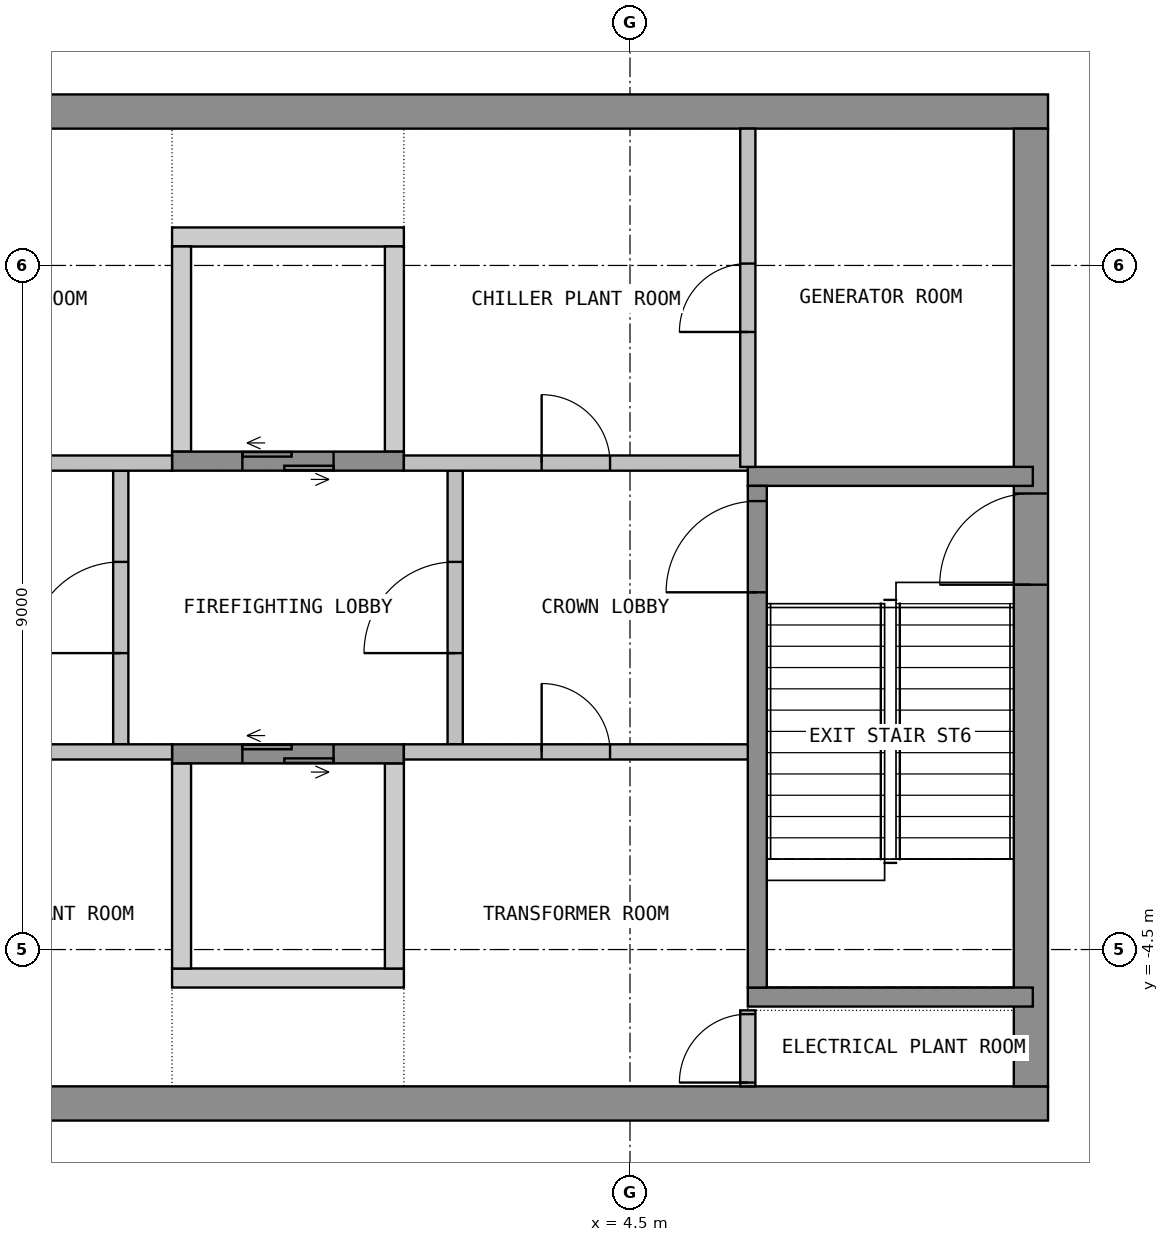
"""IFC4 building model, lengths in metres.
Left out: names, types, materials, properties, quantities, classifications, styles, units other than length and angle.
Written with IfcOpenShell. Run it as: python <this file> out.ifc"""

import sys

from ifc_helpers import new_model, si_unit, direction, frame, frame_2d, origin, place, context, subcontext, project, spatial, polyline, rectangle, outline, extrude, element, fill, save


model = new_model("IFC4")
c1 = context("Model", 3, precision=1e-05, world=origin(), true_north=direction((0.0, 1.0)))
c2 = subcontext(c1, "Body", "Model", "MODEL_VIEW")
j1 = project(units=[si_unit("LENGTHUNIT", "METRE"), si_unit("PLANEANGLEUNIT", "RADIAN")], contexts=[c1])
p1 = place(None, origin())
s1 = spatial("IfcSite", under=j1, at=p1, CompositionType="ELEMENT")
p2 = place(p1, origin())
s2 = spatial("IfcBuilding", under=s1, at=p2, CompositionType="ELEMENT")
p3 = place(p2, frame((0.0, 0.0, 323.4)))
s3 = spatial("IfcBuildingStorey", under=s2, at=p3, CompositionType="ELEMENT", Elevation=323.4)
for number, where, z_axis, x_axis in (
    (1, (-10.0, 6.525, 0.0), (0.0, 0.0, 1.0), (1.0, 0.0, 0.0)),
    (2, (-10.0, -6.525, 0.0), (0.0, 0.0, 1.0), (1.0, 0.0, 0.0)),
):
    element("IfcWall", number, at=place(p3, frame(where, z_axis=z_axis, x_axis=x_axis)), inside=s3, PredefinedType="SHEAR", context=c2, shape_type="SweptSolid", body=[
        extrude(rectangle(XDim=20.0, YDim=0.45, at=frame_2d((10.0, 0.0))), origin(), (0.0, 0.0, 1.0), 4.05),
    ])
p4 = place(p3, frame((9.775, -6.3, 0.0), z_axis=(0.0, 0.0, 1.0), x_axis=(0.0, 1.0, 0.0)))
e3 = element("IfcWall", 3, at=p4, inside=s3, PredefinedType="SHEAR", context=c2, shape_type="SweptSolid", body=[
    extrude(rectangle(XDim=12.6, YDim=0.45, at=frame_2d((6.3, 0.0))), origin(), (0.0, 0.0, 1.0), 4.05),
])
p5 = place(p4, frame((6.6, 0.0, 0.0)))
e4 = element("IfcOpeningElement", 4, at=p5, cuts=e3, PredefinedType="OPENING", context=c2, shape_type="SweptSolid", body=[
    extrude(rectangle(XDim=1.2, YDim=2.1, at=frame_2d((0.6, 1.05))), frame((0.0, 0.235, 0.0), z_axis=(0.0, -1.0, 0.0), x_axis=(1.0, 0.0, 0.0)), (0.0, 0.0, 1.0), 0.47),
])
p6 = place(p3, origin())
e5 = element("IfcWall", 5, at=p6, inside=s3, PredefinedType="SHEAR", context=c2, shape_type="SweptSolid", body=[
    extrude(outline(polyline([(-1.525, 4.75), (1.525, 4.75), (1.525, 5.0), (-1.525, 5.0), (-1.525, 4.75)])), origin(), (0.0, 0.0, 1.0), 4.05),
])
p7 = place(p3, origin())
e6 = element("IfcWall", 6, at=p7, inside=s3, PredefinedType="SHEAR", context=c2, shape_type="SweptSolid", body=[
    extrude(outline(polyline([(-1.525, 2.05), (-1.275, 2.05), (-1.275, 4.75), (-1.525, 4.75), (-1.525, 2.05)])), origin(), (0.0, 0.0, 1.0), 4.05),
])
p8 = place(p3, origin())
e7 = element("IfcWall", 7, at=p8, inside=s3, PredefinedType="SHEAR", context=c2, shape_type="SweptSolid", body=[
    extrude(outline(polyline([(1.275, 2.05), (1.525, 2.05), (1.525, 4.75), (1.275, 4.75), (1.275, 2.05)])), origin(), (0.0, 0.0, 1.0), 4.05),
])
p9 = place(p3, frame((-1.525, 1.925, 0.0), z_axis=(0.0, 0.0, 1.0), x_axis=(1.0, 0.0, 0.0)))
e8 = element("IfcWall", 8, at=p9, inside=s3, PredefinedType="SHEAR", context=c2, shape_type="SweptSolid", body=[
    extrude(rectangle(XDim=3.05, YDim=0.25, at=frame_2d((1.525, 0.0))), origin(), (0.0, 0.0, 1.0), 4.05),
])
p10 = place(p9, frame((0.925, 0.0, 0.0)))
e9 = element("IfcOpeningElement", 9, at=p10, cuts=e8, PredefinedType="OPENING", context=c2, shape_type="SweptSolid", body=[
    extrude(rectangle(XDim=1.2, YDim=2.1, at=frame_2d((0.6, 1.05))), frame((0.0, 0.135, 0.0), z_axis=(0.0, -1.0, 0.0), x_axis=(1.0, 0.0, 0.0)), (0.0, 0.0, 1.0), 0.27),
])
p11 = place(p3, origin())
e10 = element("IfcWall", 10, at=p11, inside=s3, PredefinedType="SHEAR", context=c2, shape_type="SweptSolid", body=[
    extrude(outline(polyline([(-1.525, -5.0), (1.525, -5.0), (1.525, -4.75), (-1.525, -4.75), (-1.525, -5.0)])), origin(), (0.0, 0.0, 1.0), 4.05),
])
p12 = place(p3, origin())
e11 = element("IfcWall", 11, at=p12, inside=s3, PredefinedType="SHEAR", context=c2, shape_type="SweptSolid", body=[
    extrude(outline(polyline([(-1.525, -4.75), (-1.275, -4.75), (-1.275, -2.05), (-1.525, -2.05), (-1.525, -4.75)])), origin(), (0.0, 0.0, 1.0), 4.05),
])
p13 = place(p3, origin())
e12 = element("IfcWall", 12, at=p13, inside=s3, PredefinedType="SHEAR", context=c2, shape_type="SweptSolid", body=[
    extrude(outline(polyline([(1.275, -4.75), (1.525, -4.75), (1.525, -2.05), (1.275, -2.05), (1.275, -4.75)])), origin(), (0.0, 0.0, 1.0), 4.05),
])
p14 = place(p3, frame((-1.525, -1.925, 0.0), z_axis=(0.0, 0.0, 1.0), x_axis=(1.0, 0.0, 0.0)))
e13 = element("IfcWall", 13, at=p14, inside=s3, PredefinedType="SHEAR", context=c2, shape_type="SweptSolid", body=[
    extrude(rectangle(XDim=3.05, YDim=0.25, at=frame_2d((1.525, 0.0))), origin(), (0.0, 0.0, 1.0), 4.05),
])
p15 = place(p14, frame((0.925, 0.0, 0.0)))
e14 = element("IfcOpeningElement", 14, at=p15, cuts=e13, PredefinedType="OPENING", context=c2, shape_type="SweptSolid", body=[
    extrude(rectangle(XDim=1.2, YDim=2.1, at=frame_2d((0.6, 1.05))), frame((0.0, 0.135, 0.0), z_axis=(0.0, -1.0, 0.0), x_axis=(1.0, 0.0, 0.0)), (0.0, 0.0, 1.0), 0.27),
])
p16 = place(p3, frame((-2.2, -1.8, 0.0), z_axis=(0.0, 0.0, 1.0), x_axis=(0.0, 1.0, 0.0)))
e15 = element("IfcWall", 15, at=p16, inside=s3, PredefinedType="PARTITIONING", context=c2, shape_type="SweptSolid", body=[
    extrude(rectangle(XDim=3.6, YDim=0.2, at=frame_2d((1.8, 0.0))), origin(), (0.0, 0.0, 1.0), 4.05),
])
p17 = place(p16, frame((1.2, 0.0, 0.0)))
e16 = element("IfcOpeningElement", 16, at=p17, cuts=e15, PredefinedType="OPENING", context=c2, shape_type="SweptSolid", body=[
    extrude(rectangle(XDim=1.2, YDim=2.1, at=frame_2d((0.6, 1.05))), frame((0.0, 0.11, 0.0), z_axis=(0.0, -1.0, 0.0), x_axis=(1.0, 0.0, 0.0)), (0.0, 0.0, 1.0), 0.22),
])
p18 = place(p3, frame((2.2, -1.8, 0.0), z_axis=(0.0, 0.0, 1.0), x_axis=(0.0, 1.0, 0.0)))
e17 = element("IfcWall", 17, at=p18, inside=s3, PredefinedType="PARTITIONING", context=c2, shape_type="SweptSolid", body=[
    extrude(rectangle(XDim=3.6, YDim=0.2, at=frame_2d((1.8, 0.0))), origin(), (0.0, 0.0, 1.0), 4.05),
])
p19 = place(p18, frame((1.2, 0.0, 0.0)))
e18 = element("IfcOpeningElement", 18, at=p19, cuts=e17, PredefinedType="OPENING", context=c2, shape_type="SweptSolid", body=[
    extrude(rectangle(XDim=1.2, YDim=2.1, at=frame_2d((0.6, 1.05))), frame((0.0, 0.11, 0.0), z_axis=(0.0, -1.0, 0.0), x_axis=(1.0, 0.0, 0.0)), (0.0, 0.0, 1.0), 0.22),
])
for number, where, z_axis, x_axis in (
    (19, (6.05, -5.125, 0.0), (0.0, 0.0, 1.0), (1.0, 0.0, 0.0)),
    (20, (6.05, 1.725, 0.0), (0.0, 0.0, 1.0), (1.0, 0.0, 0.0)),
):
    element("IfcWall", number, at=place(p3, frame(where, z_axis=z_axis, x_axis=x_axis)), inside=s3, PredefinedType="SHEAR", context=c2, shape_type="SweptSolid", body=[
        extrude(rectangle(XDim=3.75, YDim=0.25, at=frame_2d((1.875, 0.0))), origin(), (0.0, 0.0, 1.0), 4.05),
    ])
p20 = place(p3, frame((6.175, -5.0, 0.0), z_axis=(0.0, 0.0, 1.0), x_axis=(0.0, 1.0, 0.0)))
e21 = element("IfcWall", 21, at=p20, inside=s3, PredefinedType="SHEAR", context=c2, shape_type="SweptSolid", body=[
    extrude(rectangle(XDim=6.6, YDim=0.25, at=frame_2d((3.3, 0.0))), origin(), (0.0, 0.0, 1.0), 4.05),
])
p21 = place(p20, frame((5.2, 0.0, 0.0)))
e22 = element("IfcOpeningElement", 22, at=p21, cuts=e21, PredefinedType="OPENING", context=c2, shape_type="SweptSolid", body=[
    extrude(rectangle(XDim=1.2, YDim=2.1, at=frame_2d((0.6, 1.05))), frame((0.0, 0.135, 0.0), z_axis=(0.0, -1.0, 0.0), x_axis=(1.0, 0.0, 0.0)), (0.0, 0.0, 1.0), 0.27),
])
p22 = place(p3, frame((-6.05, 1.9, 0.0), z_axis=(0.0, 0.0, 1.0), x_axis=(1.0, 0.0, 0.0)))
e23 = element("IfcWall", 23, at=p22, inside=s3, PredefinedType="PARTITIONING", context=c2, shape_type="SweptSolid", body=[
    extrude(rectangle(XDim=4.525, YDim=0.2, at=frame_2d((2.263, 0.0))), origin(), (0.0, 0.0, 1.0), 4.05),
])
p23 = place(p22, frame((1.812, 0.0, 0.0)))
e24 = element("IfcOpeningElement", 24, at=p23, cuts=e23, PredefinedType="OPENING", context=c2, shape_type="SweptSolid", body=[
    extrude(rectangle(XDim=0.9, YDim=2.1, at=frame_2d((0.45, 1.05))), frame((0.0, 0.11, 0.0), z_axis=(0.0, -1.0, 0.0), x_axis=(1.0, 0.0, 0.0)), (0.0, 0.0, 1.0), 0.22),
])
p24 = place(p3, frame((-6.05, -1.9, 0.0), z_axis=(0.0, 0.0, 1.0), x_axis=(1.0, 0.0, 0.0)))
e25 = element("IfcWall", 25, at=p24, inside=s3, PredefinedType="PARTITIONING", context=c2, shape_type="SweptSolid", body=[
    extrude(rectangle(XDim=4.525, YDim=0.2, at=frame_2d((2.263, 0.0))), origin(), (0.0, 0.0, 1.0), 4.05),
])
p25 = place(p24, frame((1.812, 0.0, 0.0)))
e26 = element("IfcOpeningElement", 26, at=p25, cuts=e25, PredefinedType="OPENING", context=c2, shape_type="SweptSolid", body=[
    extrude(rectangle(XDim=0.9, YDim=2.1, at=frame_2d((0.45, 1.05))), frame((0.0, 0.11, 0.0), z_axis=(0.0, -1.0, 0.0), x_axis=(1.0, 0.0, 0.0)), (0.0, 0.0, 1.0), 0.22),
])
p26 = place(p3, frame((1.525, 1.9, 0.0), z_axis=(0.0, 0.0, 1.0), x_axis=(1.0, 0.0, 0.0)))
e27 = element("IfcWall", 27, at=p26, inside=s3, PredefinedType="PARTITIONING", context=c2, shape_type="SweptSolid", body=[
    extrude(rectangle(XDim=4.525, YDim=0.2, at=frame_2d((2.263, 0.0))), origin(), (0.0, 0.0, 1.0), 4.05),
])
p27 = place(p26, frame((1.812, 0.0, 0.0)))
e28 = element("IfcOpeningElement", 28, at=p27, cuts=e27, PredefinedType="OPENING", context=c2, shape_type="SweptSolid", body=[
    extrude(rectangle(XDim=0.9, YDim=2.1, at=frame_2d((0.45, 1.05))), frame((0.0, 0.11, 0.0), z_axis=(0.0, -1.0, 0.0), x_axis=(1.0, 0.0, 0.0)), (0.0, 0.0, 1.0), 0.22),
])
p28 = place(p3, frame((1.525, -1.9, 0.0), z_axis=(0.0, 0.0, 1.0), x_axis=(1.0, 0.0, 0.0)))
e29 = element("IfcWall", 29, at=p28, inside=s3, PredefinedType="PARTITIONING", context=c2, shape_type="SweptSolid", body=[
    extrude(rectangle(XDim=4.525, YDim=0.2, at=frame_2d((2.263, 0.0))), origin(), (0.0, 0.0, 1.0), 4.05),
])
p29 = place(p28, frame((1.812, 0.0, 0.0)))
e30 = element("IfcOpeningElement", 30, at=p29, cuts=e29, PredefinedType="OPENING", context=c2, shape_type="SweptSolid", body=[
    extrude(rectangle(XDim=0.9, YDim=2.1, at=frame_2d((0.45, 1.05))), frame((0.0, 0.11, 0.0), z_axis=(0.0, -1.0, 0.0), x_axis=(1.0, 0.0, 0.0)), (0.0, 0.0, 1.0), 0.22),
])
p30 = place(p3, frame((6.05, 1.85, 0.0), z_axis=(0.0, 0.0, 1.0), x_axis=(0.0, 1.0, 0.0)))
e31 = element("IfcWall", 31, at=p30, inside=s3, PredefinedType="PARTITIONING", context=c2, shape_type="SweptSolid", body=[
    extrude(rectangle(XDim=4.45, YDim=0.2, at=frame_2d((2.225, 0.0))), origin(), (0.0, 0.0, 1.0), 4.05),
])
p31 = place(p30, frame((1.775, 0.0, 0.0)))
e32 = element("IfcOpeningElement", 32, at=p31, cuts=e31, PredefinedType="OPENING", context=c2, shape_type="SweptSolid", body=[
    extrude(rectangle(XDim=0.9, YDim=2.1, at=frame_2d((0.45, 1.05))), frame((0.0, 0.11, 0.0), z_axis=(0.0, -1.0, 0.0), x_axis=(1.0, 0.0, 0.0)), (0.0, 0.0, 1.0), 0.22),
])
p32 = place(p3, frame((6.05, -6.3, 0.0), z_axis=(0.0, 0.0, 1.0), x_axis=(0.0, 1.0, 0.0)))
e33 = element("IfcWall", 33, at=p32, inside=s3, PredefinedType="PARTITIONING", context=c2, shape_type="SweptSolid", body=[
    extrude(rectangle(XDim=1.0, YDim=0.2, at=frame_2d((0.5, 0.0))), origin(), (0.0, 0.0, 1.0), 4.05),
])
p33 = place(p32, frame((0.05, 0.0, 0.0)))
e34 = element("IfcOpeningElement", 34, at=p33, cuts=e33, PredefinedType="OPENING", context=c2, shape_type="SweptSolid", body=[
    extrude(rectangle(XDim=0.9, YDim=2.1, at=frame_2d((0.45, 1.05))), frame((0.0, 0.11, 0.0), z_axis=(0.0, -1.0, 0.0), x_axis=(1.0, 0.0, 0.0)), (0.0, 0.0, 1.0), 0.22),
])
p34 = place(p5, origin())
e35 = element("IfcDoor", 35, at=p34, inside=s3, OperationType="SINGLE_SWING_RIGHT", PredefinedType="DOOR", context=c2, shape_type="SweptSolid", body=[
    extrude(rectangle(XDim=1.2, YDim=2.1, at=frame_2d((0.6, 1.05))), frame((0.0, 0.025, 0.0), z_axis=(0.0, -1.0, 0.0), x_axis=(1.0, 0.0, 0.0)), (0.0, 0.0, 1.0), 0.05),
])
fill(e4, e35)
p35 = place(p10, origin())
e36 = element("IfcDoor", 36, at=p35, inside=s3, OperationType="DOUBLE_DOOR_SLIDING", PredefinedType="DOOR", context=c2, shape_type="SweptSolid", body=[
    extrude(rectangle(XDim=1.2, YDim=2.1, at=frame_2d((0.6, 1.05))), frame((0.0, 0.025, 0.0), z_axis=(0.0, -1.0, 0.0), x_axis=(1.0, 0.0, 0.0)), (0.0, 0.0, 1.0), 0.05),
])
fill(e9, e36)
p36 = place(p15, origin())
e37 = element("IfcDoor", 37, at=p36, inside=s3, OperationType="DOUBLE_DOOR_SLIDING", PredefinedType="DOOR", context=c2, shape_type="SweptSolid", body=[
    extrude(rectangle(XDim=1.2, YDim=2.1, at=frame_2d((0.6, 1.05))), frame((0.0, 0.025, 0.0), z_axis=(0.0, -1.0, 0.0), x_axis=(1.0, 0.0, 0.0)), (0.0, 0.0, 1.0), 0.05),
])
fill(e14, e37)
p37 = place(p17, origin())
e38 = element("IfcDoor", 38, at=p37, inside=s3, OperationType="SINGLE_SWING_LEFT", PredefinedType="DOOR", context=c2, shape_type="SweptSolid", body=[
    extrude(rectangle(XDim=1.2, YDim=2.1, at=frame_2d((0.6, 1.05))), frame((0.0, 0.025, 0.0), z_axis=(0.0, -1.0, 0.0), x_axis=(1.0, 0.0, 0.0)), (0.0, 0.0, 1.0), 0.05),
])
fill(e16, e38)
p38 = place(p19, origin())
e39 = element("IfcDoor", 39, at=p38, inside=s3, OperationType="SINGLE_SWING_LEFT", PredefinedType="DOOR", context=c2, shape_type="SweptSolid", body=[
    extrude(rectangle(XDim=1.2, YDim=2.1, at=frame_2d((0.6, 1.05))), frame((0.0, 0.025, 0.0), z_axis=(0.0, -1.0, 0.0), x_axis=(1.0, 0.0, 0.0)), (0.0, 0.0, 1.0), 0.05),
])
fill(e18, e39)
p39 = place(p21, origin())
e40 = element("IfcDoor", 40, at=p39, inside=s3, OperationType="SINGLE_SWING_LEFT", PredefinedType="DOOR", context=c2, shape_type="SweptSolid", body=[
    extrude(rectangle(XDim=1.2, YDim=2.1, at=frame_2d((0.6, 1.05))), frame((0.0, 0.025, 0.0), z_axis=(0.0, -1.0, 0.0), x_axis=(1.0, 0.0, 0.0)), (0.0, 0.0, 1.0), 0.05),
])
fill(e22, e40)
p40 = place(p27, origin())
e41 = element("IfcDoor", 41, at=p40, inside=s3, OperationType="SINGLE_SWING_LEFT", PredefinedType="DOOR", context=c2, shape_type="SweptSolid", body=[
    extrude(rectangle(XDim=0.9, YDim=2.1, at=frame_2d((0.45, 1.05))), frame((0.0, 0.025, 0.0), z_axis=(0.0, -1.0, 0.0), x_axis=(1.0, 0.0, 0.0)), (0.0, 0.0, 1.0), 0.05),
])
fill(e28, e41)
p41 = place(p29, origin())
e42 = element("IfcDoor", 42, at=p41, inside=s3, OperationType="SINGLE_SWING_LEFT", PredefinedType="DOOR", context=c2, shape_type="SweptSolid", body=[
    extrude(rectangle(XDim=0.9, YDim=2.1, at=frame_2d((0.45, 1.05))), frame((0.0, 0.025, 0.0), z_axis=(0.0, -1.0, 0.0), x_axis=(1.0, 0.0, 0.0)), (0.0, 0.0, 1.0), 0.05),
])
fill(e30, e42)
p42 = place(p31, origin())
e43 = element("IfcDoor", 43, at=p42, inside=s3, OperationType="SINGLE_SWING_LEFT", PredefinedType="DOOR", context=c2, shape_type="SweptSolid", body=[
    extrude(rectangle(XDim=0.9, YDim=2.1, at=frame_2d((0.45, 1.05))), frame((0.0, 0.025, 0.0), z_axis=(0.0, -1.0, 0.0), x_axis=(1.0, 0.0, 0.0)), (0.0, 0.0, 1.0), 0.05),
])
fill(e32, e43)
p43 = place(p33, origin())
e44 = element("IfcDoor", 44, at=p43, inside=s3, OperationType="SINGLE_SWING_LEFT", PredefinedType="DOOR", context=c2, shape_type="SweptSolid", body=[
    extrude(rectangle(XDim=0.9, YDim=2.1, at=frame_2d((0.45, 1.05))), frame((0.0, 0.025, 0.0), z_axis=(0.0, -1.0, 0.0), x_axis=(1.0, 0.0, 0.0)), (0.0, 0.0, 1.0), 0.05),
])
fill(e34, e44)
save(model, sys.argv[1])
